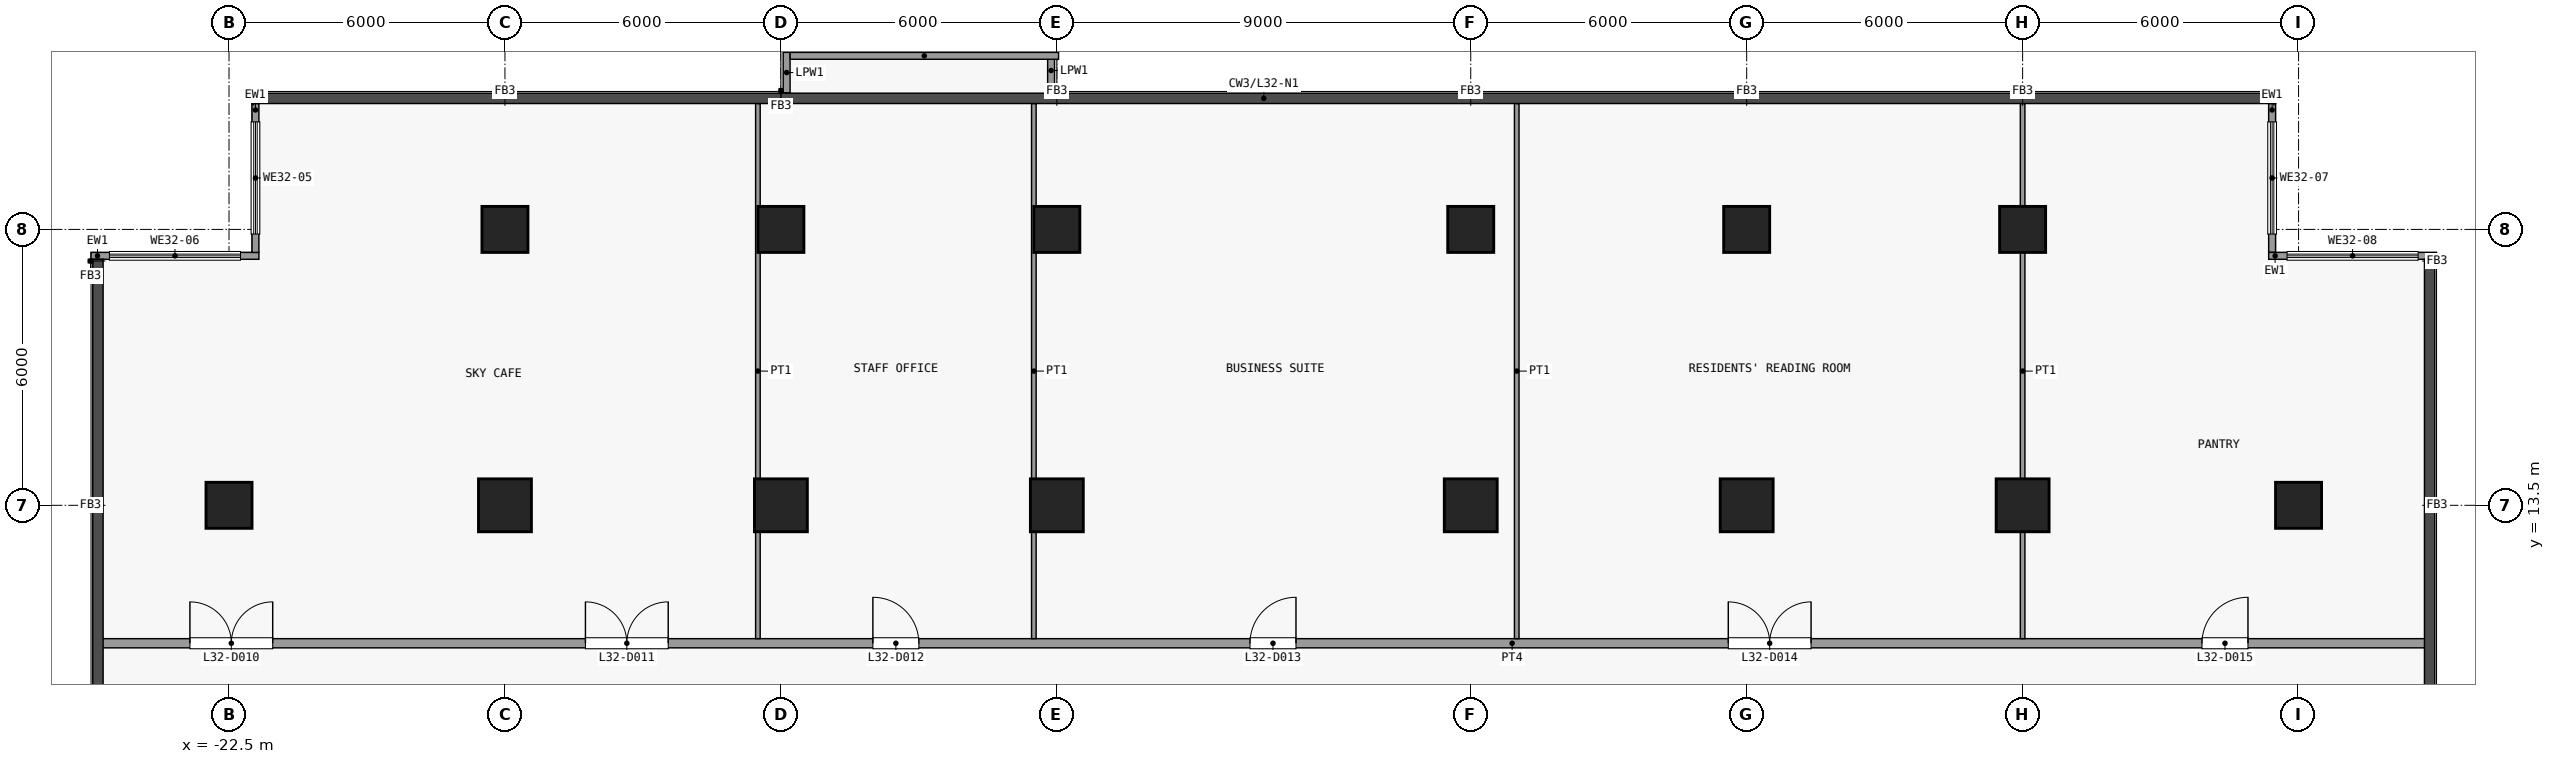
"""IFC4 building model, lengths in metres.
Left out: names, types, materials, properties, quantities, classifications, styles, units other than length and angle.
Written with IfcOpenShell. Run it as: python <this file> out.ifc"""

import sys

from ifc_helpers import new_model, si_unit, direction, frame, frame_2d, origin, origin_2d, place, context, subcontext, project, spatial, rectangle, extrude, element, fill, save


model = new_model("IFC4")
c1 = context("Model", 3, precision=1e-05, world=origin(), true_north=direction((0.0, 1.0)))
c2 = subcontext(c1, "Body", "Model", "MODEL_VIEW")
j1 = project(units=[si_unit("LENGTHUNIT", "METRE"), si_unit("PLANEANGLEUNIT", "RADIAN")], contexts=[c1])
p1 = place(None, origin())
s1 = spatial("IfcSite", under=j1, at=p1, CompositionType="ELEMENT")
p2 = place(p1, origin())
s2 = spatial("IfcBuilding", under=s1, at=p2, CompositionType="ELEMENT")
p3 = place(p2, frame((0.0, 0.0, 127.9)))
s3 = spatial("IfcBuildingStorey", under=s2, at=p3, CompositionType="ELEMENT", Elevation=127.9)
p4 = place(p3, frame((-22.5, 13.5, 0.0), z_axis=(0.0, 0.0, 1.0), x_axis=(1.0, 0.0, 0.0)))
e1 = element("IfcColumn", 1, at=p4, inside=s3, PredefinedType="COLUMN", context=c2, shape_type="SweptSolid", body=[
    extrude(rectangle(XDim=1.0, YDim=1.0, at=origin_2d()), origin(), (0.0, 0.0, 1.0), 6.0),
])
p5 = place(p3, frame((-16.5, 13.5, 0.0), z_axis=(0.0, 0.0, 1.0), x_axis=(1.0, 0.0, 0.0)))
e2 = element("IfcColumn", 2, at=p5, inside=s3, PredefinedType="COLUMN", context=c2, shape_type="SweptSolid", body=[
    extrude(rectangle(XDim=1.15, YDim=1.15, at=origin_2d()), origin(), (0.0, 0.0, 1.0), 6.0),
])
p6 = place(p3, frame((-16.5, 19.5, 0.0), z_axis=(0.0, 0.0, 1.0), x_axis=(1.0, 0.0, 0.0)))
e3 = element("IfcColumn", 3, at=p6, inside=s3, PredefinedType="COLUMN", context=c2, shape_type="SweptSolid", body=[
    extrude(rectangle(XDim=1.0, YDim=1.0, at=origin_2d()), origin(), (0.0, 0.0, 1.0), 6.0),
])
p7 = place(p3, frame((-10.5, 13.5, 0.0), z_axis=(0.0, 0.0, 1.0), x_axis=(1.0, 0.0, 0.0)))
e4 = element("IfcColumn", 4, at=p7, inside=s3, PredefinedType="COLUMN", context=c2, shape_type="SweptSolid", body=[
    extrude(rectangle(XDim=1.15, YDim=1.15, at=origin_2d()), origin(), (0.0, 0.0, 1.0), 6.0),
])
p8 = place(p3, frame((-10.5, 19.5, 0.0), z_axis=(0.0, 0.0, 1.0), x_axis=(1.0, 0.0, 0.0)))
e5 = element("IfcColumn", 5, at=p8, inside=s3, PredefinedType="COLUMN", context=c2, shape_type="SweptSolid", body=[
    extrude(rectangle(XDim=1.0, YDim=1.0, at=origin_2d()), origin(), (0.0, 0.0, 1.0), 6.0),
])
p9 = place(p3, frame((-4.5, 13.5, 0.0), z_axis=(0.0, 0.0, 1.0), x_axis=(1.0, 0.0, 0.0)))
e6 = element("IfcColumn", 6, at=p9, inside=s3, PredefinedType="COLUMN", context=c2, shape_type="SweptSolid", body=[
    extrude(rectangle(XDim=1.15, YDim=1.15, at=origin_2d()), origin(), (0.0, 0.0, 1.0), 6.0),
])
p10 = place(p3, frame((-4.5, 19.5, 0.0), z_axis=(0.0, 0.0, 1.0), x_axis=(1.0, 0.0, 0.0)))
e7 = element("IfcColumn", 7, at=p10, inside=s3, PredefinedType="COLUMN", context=c2, shape_type="SweptSolid", body=[
    extrude(rectangle(XDim=1.0, YDim=1.0, at=origin_2d()), origin(), (0.0, 0.0, 1.0), 6.0),
])
p11 = place(p3, frame((4.5, 13.5, 0.0), z_axis=(0.0, 0.0, 1.0), x_axis=(1.0, 0.0, 0.0)))
e8 = element("IfcColumn", 8, at=p11, inside=s3, PredefinedType="COLUMN", context=c2, shape_type="SweptSolid", body=[
    extrude(rectangle(XDim=1.15, YDim=1.15, at=origin_2d()), origin(), (0.0, 0.0, 1.0), 6.0),
])
p12 = place(p3, frame((4.5, 19.5, 0.0), z_axis=(0.0, 0.0, 1.0), x_axis=(1.0, 0.0, 0.0)))
e9 = element("IfcColumn", 9, at=p12, inside=s3, PredefinedType="COLUMN", context=c2, shape_type="SweptSolid", body=[
    extrude(rectangle(XDim=1.0, YDim=1.0, at=origin_2d()), origin(), (0.0, 0.0, 1.0), 6.0),
])
p13 = place(p3, frame((10.5, 13.5, 0.0), z_axis=(0.0, 0.0, 1.0), x_axis=(1.0, 0.0, 0.0)))
e10 = element("IfcColumn", 10, at=p13, inside=s3, PredefinedType="COLUMN", context=c2, shape_type="SweptSolid", body=[
    extrude(rectangle(XDim=1.15, YDim=1.15, at=origin_2d()), origin(), (0.0, 0.0, 1.0), 6.0),
])
p14 = place(p3, frame((10.5, 19.5, 0.0), z_axis=(0.0, 0.0, 1.0), x_axis=(1.0, 0.0, 0.0)))
e11 = element("IfcColumn", 11, at=p14, inside=s3, PredefinedType="COLUMN", context=c2, shape_type="SweptSolid", body=[
    extrude(rectangle(XDim=1.0, YDim=1.0, at=origin_2d()), origin(), (0.0, 0.0, 1.0), 6.0),
])
p15 = place(p3, frame((16.5, 13.5, 0.0), z_axis=(0.0, 0.0, 1.0), x_axis=(1.0, 0.0, 0.0)))
e12 = element("IfcColumn", 12, at=p15, inside=s3, PredefinedType="COLUMN", context=c2, shape_type="SweptSolid", body=[
    extrude(rectangle(XDim=1.15, YDim=1.15, at=origin_2d()), origin(), (0.0, 0.0, 1.0), 6.0),
])
for number, where, z_axis, x_axis in (
    (13, (16.5, 19.5, 0.0), (0.0, 0.0, 1.0), (1.0, 0.0, 0.0)),
    (14, (22.5, 13.5, 0.0), (0.0, 0.0, 1.0), (1.0, 0.0, 0.0)),
):
    element("IfcColumn", number, at=place(p3, frame(where, z_axis=z_axis, x_axis=x_axis)), inside=s3, PredefinedType="COLUMN", context=c2, shape_type="SweptSolid", body=[
        extrude(rectangle(XDim=1.0, YDim=1.0, at=origin_2d()), origin(), (0.0, 0.0, 1.0), 6.0),
    ])
p16 = place(p3, frame((-21.925, 19.0, 0.0), z_axis=(0.0, 0.0, 1.0), x_axis=(0.0, 1.0, 0.0)))
e15 = element("IfcWall", 15, at=p16, inside=s3, PredefinedType="SOLIDWALL", context=c2, shape_type="SweptSolid", body=[
    extrude(rectangle(XDim=3.238, YDim=0.15, at=frame_2d((1.619, 0.0))), origin(), (0.0, 0.0, 1.0), 5.7),
])
p17 = place(p16, frame((0.399, 0.0, 0.9)))
e16 = element("IfcOpeningElement", 16, at=p17, cuts=e15, PredefinedType="OPENING", context=c2, shape_type="SweptSolid", body=[
    extrude(rectangle(XDim=2.44, YDim=2.4, at=frame_2d((1.22, 1.2))), frame((0.0, 0.085, 0.0), z_axis=(0.0, -1.0, 0.0), x_axis=(1.0, 0.0, 0.0)), (0.0, 0.0, 1.0), 0.17),
])
p18 = place(p3, frame((-25.5, 18.925, 0.0), z_axis=(0.0, 0.0, 1.0), x_axis=(1.0, 0.0, 0.0)))
e17 = element("IfcWall", 17, at=p18, inside=s3, PredefinedType="SOLIDWALL", context=c2, shape_type="SweptSolid", body=[
    extrude(rectangle(XDim=3.65, YDim=0.15, at=frame_2d((1.825, 0.0))), origin(), (0.0, 0.0, 1.0), 5.7),
])
p19 = place(p18, frame((0.4, 0.0, 0.9)))
e18 = element("IfcOpeningElement", 18, at=p19, cuts=e17, PredefinedType="OPENING", context=c2, shape_type="SweptSolid", body=[
    extrude(rectangle(XDim=2.85, YDim=2.4, at=frame_2d((1.425, 1.2))), frame((0.0, 0.085, 0.0), z_axis=(0.0, -1.0, 0.0), x_axis=(1.0, 0.0, 0.0)), (0.0, 0.0, 1.0), 0.17),
])
p20 = place(p3, frame((21.925, 22.238, 0.0), z_axis=(0.0, 0.0, 1.0), x_axis=(0.0, -1.0, 0.0)))
e19 = element("IfcWall", 19, at=p20, inside=s3, PredefinedType="SOLIDWALL", context=c2, shape_type="SweptSolid", body=[
    extrude(rectangle(XDim=3.238, YDim=0.15, at=frame_2d((1.619, 0.0))), origin(), (0.0, 0.0, 1.0), 5.7),
])
p21 = place(p20, frame((0.399, 0.0, 0.9)))
e20 = element("IfcOpeningElement", 20, at=p21, cuts=e19, PredefinedType="OPENING", context=c2, shape_type="SweptSolid", body=[
    extrude(rectangle(XDim=2.44, YDim=2.4, at=frame_2d((1.22, 1.2))), frame((0.0, 0.085, 0.0), z_axis=(0.0, -1.0, 0.0), x_axis=(1.0, 0.0, 0.0)), (0.0, 0.0, 1.0), 0.17),
])
p22 = place(p3, frame((21.85, 18.925, 0.0), z_axis=(0.0, 0.0, 1.0), x_axis=(1.0, 0.0, 0.0)))
e21 = element("IfcWall", 21, at=p22, inside=s3, PredefinedType="SOLIDWALL", context=c2, shape_type="SweptSolid", body=[
    extrude(rectangle(XDim=3.65, YDim=0.15, at=frame_2d((1.825, 0.0))), origin(), (0.0, 0.0, 1.0), 5.7),
])
p23 = place(p22, frame((0.4, 0.0, 0.9)))
e22 = element("IfcOpeningElement", 22, at=p23, cuts=e21, PredefinedType="OPENING", context=c2, shape_type="SweptSolid", body=[
    extrude(rectangle(XDim=2.85, YDim=2.4, at=frame_2d((1.425, 1.2))), frame((0.0, 0.085, 0.0), z_axis=(0.0, -1.0, 0.0), x_axis=(1.0, 0.0, 0.0)), (0.0, 0.0, 1.0), 0.17),
])
p24 = place(p3, frame((-4.625, 23.438, 0.0), z_axis=(0.0, 0.0, 1.0), x_axis=(0.0, -1.0, 0.0)))
e23 = element("IfcWall", 23, at=p24, inside=s3, PredefinedType="PARAPET", context=c2, shape_type="SweptSolid", body=[
    extrude(rectangle(XDim=0.965, YDim=0.15, at=frame_2d((0.482, 0.0))), origin(), (0.0, 0.0, 1.0), 1.15),
])
p25 = place(p3, frame((-10.375, 22.472, 0.0), z_axis=(0.0, 0.0, 1.0), x_axis=(0.0, 1.0, 0.0)))
e24 = element("IfcWall", 24, at=p25, inside=s3, PredefinedType="PARAPET", context=c2, shape_type="SweptSolid", body=[
    extrude(rectangle(XDim=0.878, YDim=0.15, at=frame_2d((0.439, 0.0))), origin(), (0.0, 0.0, 1.0), 1.15),
])
p26 = place(p3, frame((-10.3, 23.275, 0.0), z_axis=(0.0, 0.0, 1.0), x_axis=(1.0, 0.0, 0.0)))
e25 = element("IfcWall", 25, at=p26, inside=s3, PredefinedType="PARAPET", context=c2, shape_type="SweptSolid", body=[
    extrude(rectangle(XDim=5.838, YDim=0.15, at=frame_2d((2.919, 0.0))), origin(), (0.0, 0.0, 1.0), 1.15),
])
p27 = place(p3, frame((-25.35, 10.5, 0.0), z_axis=(0.0, 0.0, 1.0), x_axis=(1.0, 0.0, 0.0)))
e26 = element("IfcWall", 26, at=p27, inside=s3, PredefinedType="PARTITIONING", context=c2, shape_type="SweptSolid", body=[
    extrude(rectangle(XDim=50.7, YDim=0.2, at=frame_2d((25.35, 0.0))), origin(), (0.0, 0.0, 1.0), 5.7),
])
p28 = place(p27, frame((2.0, 0.0, 0.0)))
e27 = element("IfcOpeningElement", 27, at=p28, cuts=e26, PredefinedType="OPENING", context=c2, shape_type="SweptSolid", body=[
    extrude(rectangle(XDim=1.8, YDim=2.1, at=frame_2d((0.9, 1.05))), frame((0.0, 0.11, 0.0), z_axis=(0.0, -1.0, 0.0), x_axis=(1.0, 0.0, 0.0)), (0.0, 0.0, 1.0), 0.22),
])
p29 = place(p27, frame((10.6, 0.0, 0.0)))
e28 = element("IfcOpeningElement", 28, at=p29, cuts=e26, PredefinedType="OPENING", context=c2, shape_type="SweptSolid", body=[
    extrude(rectangle(XDim=1.8, YDim=2.1, at=frame_2d((0.9, 1.05))), frame((0.0, 0.11, 0.0), z_axis=(0.0, -1.0, 0.0), x_axis=(1.0, 0.0, 0.0)), (0.0, 0.0, 1.0), 0.22),
])
p30 = place(p27, frame((16.85, 0.0, 0.0)))
e29 = element("IfcOpeningElement", 29, at=p30, cuts=e26, PredefinedType="OPENING", context=c2, shape_type="SweptSolid", body=[
    extrude(rectangle(XDim=1.0, YDim=2.1, at=frame_2d((0.5, 1.05))), frame((0.0, 0.11, 0.0), z_axis=(0.0, -1.0, 0.0), x_axis=(1.0, 0.0, 0.0)), (0.0, 0.0, 1.0), 0.22),
])
p31 = place(p27, frame((25.05, 0.0, 0.0)))
e30 = element("IfcOpeningElement", 30, at=p31, cuts=e26, PredefinedType="OPENING", context=c2, shape_type="SweptSolid", body=[
    extrude(rectangle(XDim=1.0, YDim=2.1, at=frame_2d((0.5, 1.05))), frame((0.0, 0.11, 0.0), z_axis=(0.0, -1.0, 0.0), x_axis=(1.0, 0.0, 0.0)), (0.0, 0.0, 1.0), 0.22),
])
p32 = place(p27, frame((35.45, 0.0, 0.0)))
e31 = element("IfcOpeningElement", 31, at=p32, cuts=e26, PredefinedType="OPENING", context=c2, shape_type="SweptSolid", body=[
    extrude(rectangle(XDim=1.8, YDim=2.1, at=frame_2d((0.9, 1.05))), frame((0.0, 0.11, 0.0), z_axis=(0.0, -1.0, 0.0), x_axis=(1.0, 0.0, 0.0)), (0.0, 0.0, 1.0), 0.22),
])
p33 = place(p27, frame((45.75, 0.0, 0.0)))
e32 = element("IfcOpeningElement", 32, at=p33, cuts=e26, PredefinedType="OPENING", context=c2, shape_type="SweptSolid", body=[
    extrude(rectangle(XDim=1.0, YDim=2.1, at=frame_2d((0.5, 1.05))), frame((0.0, 0.11, 0.0), z_axis=(0.0, -1.0, 0.0), x_axis=(1.0, 0.0, 0.0)), (0.0, 0.0, 1.0), 0.22),
])
for number, where, z_axis, x_axis in (
    (33, (-11.0, 10.6, 0.0), (0.0, 0.0, 1.0), (0.0, 1.0, 0.0)),
    (34, (-5.0, 10.6, 0.0), (0.0, 0.0, 1.0), (0.0, 1.0, 0.0)),
    (35, (5.5, 10.6, 0.0), (0.0, 0.0, 1.0), (0.0, 1.0, 0.0)),
    (36, (16.5, 10.6, 0.0), (0.0, 0.0, 1.0), (0.0, 1.0, 0.0)),
):
    element("IfcWall", number, at=place(p3, frame(where, z_axis=z_axis, x_axis=x_axis)), inside=s3, PredefinedType="PARTITIONING", context=c2, shape_type="SweptSolid", body=[
        extrude(rectangle(XDim=11.637, YDim=0.1, at=frame_2d((5.819, 0.0))), origin(), (0.0, 0.0, 1.0), 5.7),
    ])
p34 = place(p17, origin())
e37 = element("IfcWindow", 37, at=p34, inside=s3, PartitioningType="SINGLE_PANEL", PredefinedType="WINDOW", context=c2, shape_type="SweptSolid", body=[
    extrude(rectangle(XDim=2.44, YDim=2.4, at=frame_2d((1.22, 1.2))), frame((0.0, 0.03, 0.0), z_axis=(0.0, -1.0, 0.0), x_axis=(1.0, 0.0, 0.0)), (0.0, 0.0, 1.0), 0.06),
])
fill(e16, e37)
p35 = place(p19, origin())
e38 = element("IfcWindow", 38, at=p35, inside=s3, PartitioningType="SINGLE_PANEL", PredefinedType="WINDOW", context=c2, shape_type="SweptSolid", body=[
    extrude(rectangle(XDim=2.85, YDim=2.4, at=frame_2d((1.425, 1.2))), frame((0.0, 0.03, 0.0), z_axis=(0.0, -1.0, 0.0), x_axis=(1.0, 0.0, 0.0)), (0.0, 0.0, 1.0), 0.06),
])
fill(e18, e38)
p36 = place(p21, origin())
e39 = element("IfcWindow", 39, at=p36, inside=s3, PartitioningType="SINGLE_PANEL", PredefinedType="WINDOW", context=c2, shape_type="SweptSolid", body=[
    extrude(rectangle(XDim=2.44, YDim=2.4, at=frame_2d((1.22, 1.2))), frame((0.0, 0.03, 0.0), z_axis=(0.0, -1.0, 0.0), x_axis=(1.0, 0.0, 0.0)), (0.0, 0.0, 1.0), 0.06),
])
fill(e20, e39)
p37 = place(p23, origin())
e40 = element("IfcWindow", 40, at=p37, inside=s3, PartitioningType="SINGLE_PANEL", PredefinedType="WINDOW", context=c2, shape_type="SweptSolid", body=[
    extrude(rectangle(XDim=2.85, YDim=2.4, at=frame_2d((1.425, 1.2))), frame((0.0, 0.03, 0.0), z_axis=(0.0, -1.0, 0.0), x_axis=(1.0, 0.0, 0.0)), (0.0, 0.0, 1.0), 0.06),
])
fill(e22, e40)
p38 = place(p28, origin())
e41 = element("IfcDoor", 41, at=p38, inside=s3, OperationType="DOUBLE_DOOR_SINGLE_SWING", PredefinedType="DOOR", context=c2, shape_type="SweptSolid", body=[
    extrude(rectangle(XDim=1.8, YDim=2.1, at=frame_2d((0.9, 1.05))), frame((0.0, 0.025, 0.0), z_axis=(0.0, -1.0, 0.0), x_axis=(1.0, 0.0, 0.0)), (0.0, 0.0, 1.0), 0.05),
])
fill(e27, e41)
p39 = place(p29, origin())
e42 = element("IfcDoor", 42, at=p39, inside=s3, OperationType="DOUBLE_DOOR_SINGLE_SWING", PredefinedType="DOOR", context=c2, shape_type="SweptSolid", body=[
    extrude(rectangle(XDim=1.8, YDim=2.1, at=frame_2d((0.9, 1.05))), frame((0.0, 0.025, 0.0), z_axis=(0.0, -1.0, 0.0), x_axis=(1.0, 0.0, 0.0)), (0.0, 0.0, 1.0), 0.05),
])
fill(e28, e42)
p40 = place(p30, origin())
e43 = element("IfcDoor", 43, at=p40, inside=s3, OperationType="SINGLE_SWING_RIGHT", PredefinedType="DOOR", context=c2, shape_type="SweptSolid", body=[
    extrude(rectangle(XDim=1.0, YDim=2.1, at=frame_2d((0.5, 1.05))), frame((0.0, 0.025, 0.0), z_axis=(0.0, -1.0, 0.0), x_axis=(1.0, 0.0, 0.0)), (0.0, 0.0, 1.0), 0.05),
])
fill(e29, e43)
p41 = place(p31, origin())
e44 = element("IfcDoor", 44, at=p41, inside=s3, OperationType="SINGLE_SWING_LEFT", PredefinedType="DOOR", context=c2, shape_type="SweptSolid", body=[
    extrude(rectangle(XDim=1.0, YDim=2.1, at=frame_2d((0.5, 1.05))), frame((0.0, 0.025, 0.0), z_axis=(0.0, -1.0, 0.0), x_axis=(1.0, 0.0, 0.0)), (0.0, 0.0, 1.0), 0.05),
])
fill(e30, e44)
p42 = place(p32, origin())
e45 = element("IfcDoor", 45, at=p42, inside=s3, OperationType="DOUBLE_DOOR_SINGLE_SWING", PredefinedType="DOOR", context=c2, shape_type="SweptSolid", body=[
    extrude(rectangle(XDim=1.8, YDim=2.1, at=frame_2d((0.9, 1.05))), frame((0.0, 0.025, 0.0), z_axis=(0.0, -1.0, 0.0), x_axis=(1.0, 0.0, 0.0)), (0.0, 0.0, 1.0), 0.05),
])
fill(e31, e45)
p43 = place(p33, origin())
e46 = element("IfcDoor", 46, at=p43, inside=s3, OperationType="SINGLE_SWING_LEFT", PredefinedType="DOOR", context=c2, shape_type="SweptSolid", body=[
    extrude(rectangle(XDim=1.0, YDim=2.1, at=frame_2d((0.5, 1.05))), frame((0.0, 0.025, 0.0), z_axis=(0.0, -1.0, 0.0), x_axis=(1.0, 0.0, 0.0)), (0.0, 0.0, 1.0), 0.05),
])
fill(e32, e46)
save(model, sys.argv[1])
